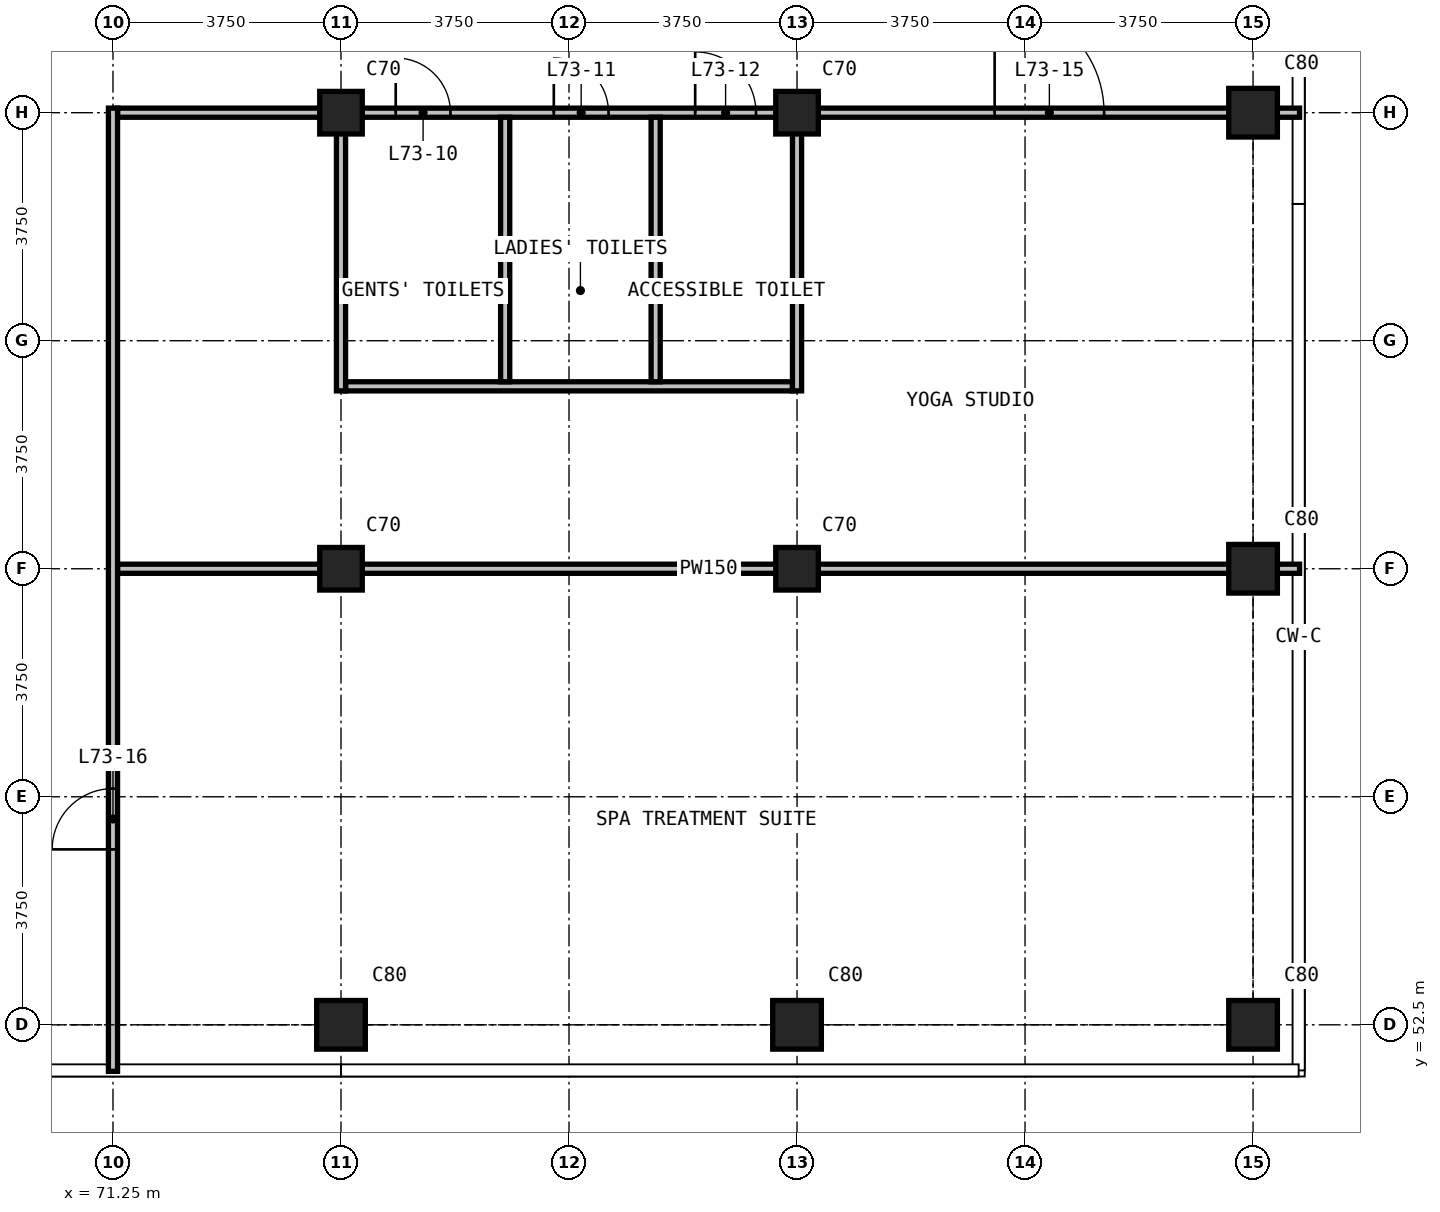
"""IFC4 building model, lengths in metres.
Left out: names, types, materials, properties, quantities, classifications, styles, units other than length and angle.
Written with IfcOpenShell. Run it as: python <this file> out.ifc"""

import sys

from ifc_helpers import new_model, si_unit, direction, frame, frame_2d, origin, origin_2d, place, context, subcontext, project, spatial, rectangle, extrude, element, fill, save


model = new_model("IFC4")
c1 = context("Model", 3, precision=1e-05, world=origin(), true_north=direction((0.0, 1.0)))
c2 = subcontext(c1, "Body", "Model", "MODEL_VIEW")
j1 = project(units=[si_unit("LENGTHUNIT", "METRE"), si_unit("PLANEANGLEUNIT", "RADIAN")], contexts=[c1])
p1 = place(None, origin())
s1 = spatial("IfcSite", under=j1, at=p1, CompositionType="ELEMENT")
p2 = place(p1, origin())
s2 = spatial("IfcBuilding", under=s1, at=p2, CompositionType="ELEMENT")
p3 = place(p2, frame((0.0, 0.0, 280.1)))
s3 = spatial("IfcBuildingStorey", under=s2, at=p3, CompositionType="ELEMENT", Elevation=280.1)
p4 = place(p3, frame((75.0, 52.5, 0.0), z_axis=(0.0, 0.0, 1.0), x_axis=(1.0, 0.0, 0.0)))
e1 = element("IfcColumn", 1, at=p4, inside=s3, PredefinedType="COLUMN", context=c2, shape_type="SweptSolid", body=[
    extrude(rectangle(XDim=0.8, YDim=0.8, at=origin_2d()), origin(), (0.0, 0.0, 1.0), 3.6),
])
for number, where, z_axis, x_axis in (
    (2, (75.0, 60.0, 0.0), (0.0, 0.0, 1.0), (1.0, 0.0, 0.0)),
    (3, (75.0, 67.5, 0.0), (0.0, 0.0, 1.0), (1.0, 0.0, 0.0)),
):
    element("IfcColumn", number, at=place(p3, frame(where, z_axis=z_axis, x_axis=x_axis)), inside=s3, PredefinedType="COLUMN", context=c2, shape_type="SweptSolid", body=[
        extrude(rectangle(XDim=0.7, YDim=0.7, at=origin_2d()), origin(), (0.0, 0.0, 1.0), 3.6),
    ])
p5 = place(p3, frame((82.5, 52.5, 0.0), z_axis=(0.0, 0.0, 1.0), x_axis=(1.0, 0.0, 0.0)))
e4 = element("IfcColumn", 4, at=p5, inside=s3, PredefinedType="COLUMN", context=c2, shape_type="SweptSolid", body=[
    extrude(rectangle(XDim=0.8, YDim=0.8, at=origin_2d()), origin(), (0.0, 0.0, 1.0), 3.6),
])
for number, where, z_axis, x_axis in (
    (5, (82.5, 60.0, 0.0), (0.0, 0.0, 1.0), (1.0, 0.0, 0.0)),
    (6, (82.5, 67.5, 0.0), (0.0, 0.0, 1.0), (1.0, 0.0, 0.0)),
):
    element("IfcColumn", number, at=place(p3, frame(where, z_axis=z_axis, x_axis=x_axis)), inside=s3, PredefinedType="COLUMN", context=c2, shape_type="SweptSolid", body=[
        extrude(rectangle(XDim=0.7, YDim=0.7, at=origin_2d()), origin(), (0.0, 0.0, 1.0), 3.6),
    ])
for number, where, z_axis, x_axis in (
    (7, (90.0, 52.5, 0.0), (0.0, 0.0, 1.0), (1.0, 0.0, 0.0)),
    (8, (90.0, 60.0, 0.0), (0.0, 0.0, 1.0), (1.0, 0.0, 0.0)),
    (9, (90.0, 67.5, 0.0), (0.0, 0.0, 1.0), (1.0, 0.0, 0.0)),
):
    element("IfcColumn", number, at=place(p3, frame(where, z_axis=z_axis, x_axis=x_axis)), inside=s3, PredefinedType="COLUMN", context=c2, shape_type="SweptSolid", body=[
        extrude(rectangle(XDim=0.8, YDim=0.8, at=origin_2d()), origin(), (0.0, 0.0, 1.0), 3.6),
    ])
p6 = place(p3, frame((71.325, 60.0, 0.0), z_axis=(0.0, 0.0, 1.0), x_axis=(1.0, 0.0, 0.0)))
e10 = element("IfcWall", 10, at=p6, inside=s3, PredefinedType="PARTITIONING", context=c2, shape_type="SweptSolid", body=[
    extrude(rectangle(XDim=19.44, YDim=0.15, at=frame_2d((9.72, 0.0))), origin(), (0.0, 0.0, 1.0), 3.3),
])
p7 = place(p3, frame((75.075, 63.0, 0.0), z_axis=(0.0, 0.0, 1.0), x_axis=(1.0, 0.0, 0.0)))
e11 = element("IfcWall", 11, at=p7, inside=s3, PredefinedType="PARTITIONING", context=c2, shape_type="SweptSolid", body=[
    extrude(rectangle(XDim=7.35, YDim=0.15, at=frame_2d((3.675, 0.0))), origin(), (0.0, 0.0, 1.0), 3.3),
])
p8 = place(p3, frame((71.325, 67.5, 0.0), z_axis=(0.0, 0.0, 1.0), x_axis=(1.0, 0.0, 0.0)))
e12 = element("IfcWall", 12, at=p8, inside=s3, PredefinedType="PARTITIONING", context=c2, shape_type="SweptSolid", body=[
    extrude(rectangle(XDim=19.44, YDim=0.15, at=frame_2d((9.72, 0.0))), origin(), (0.0, 0.0, 1.0), 3.3),
])
p9 = place(p8, frame((4.575, 0.0, 0.0)))
e13 = element("IfcOpeningElement", 13, at=p9, cuts=e12, PredefinedType="OPENING", context=c2, shape_type="SweptSolid", body=[
    extrude(rectangle(XDim=0.9, YDim=2.2, at=frame_2d((0.45, 1.1))), frame((0.0, 0.085, 0.0), z_axis=(0.0, -1.0, 0.0), x_axis=(1.0, 0.0, 0.0)), (0.0, 0.0, 1.0), 0.17),
])
p10 = place(p8, frame((7.175, 0.0, 0.0)))
e14 = element("IfcOpeningElement", 14, at=p10, cuts=e12, PredefinedType="OPENING", context=c2, shape_type="SweptSolid", body=[
    extrude(rectangle(XDim=0.9, YDim=2.2, at=frame_2d((0.45, 1.1))), frame((0.0, 0.085, 0.0), z_axis=(0.0, -1.0, 0.0), x_axis=(1.0, 0.0, 0.0)), (0.0, 0.0, 1.0), 0.17),
])
p11 = place(p8, frame((9.5, 0.0, 0.0)))
e15 = element("IfcOpeningElement", 15, at=p11, cuts=e12, PredefinedType="OPENING", context=c2, shape_type="SweptSolid", body=[
    extrude(rectangle(XDim=1.0, YDim=2.2, at=frame_2d((0.5, 1.1))), frame((0.0, 0.085, 0.0), z_axis=(0.0, -1.0, 0.0), x_axis=(1.0, 0.0, 0.0)), (0.0, 0.0, 1.0), 0.17),
])
p12 = place(p8, frame((14.425, 0.0, 0.0)))
e16 = element("IfcOpeningElement", 16, at=p12, cuts=e12, PredefinedType="OPENING", context=c2, shape_type="SweptSolid", body=[
    extrude(rectangle(XDim=1.8, YDim=2.2, at=frame_2d((0.9, 1.1))), frame((0.0, 0.085, 0.0), z_axis=(0.0, -1.0, 0.0), x_axis=(1.0, 0.0, 0.0)), (0.0, 0.0, 1.0), 0.17),
])
p13 = place(p3, frame((71.25, 51.735, 0.0), z_axis=(0.0, 0.0, 1.0), x_axis=(0.0, 1.0, 0.0)))
e17 = element("IfcWall", 17, at=p13, inside=s3, PredefinedType="PARTITIONING", context=c2, shape_type="SweptSolid", body=[
    extrude(rectangle(XDim=15.84, YDim=0.15, at=frame_2d((7.92, 0.0))), origin(), (0.0, 0.0, 1.0), 3.3),
])
p14 = place(p13, frame((3.65, 0.0, 0.0)))
e18 = element("IfcOpeningElement", 18, at=p14, cuts=e17, PredefinedType="OPENING", context=c2, shape_type="SweptSolid", body=[
    extrude(rectangle(XDim=1.0, YDim=2.2, at=frame_2d((0.5, 1.1))), frame((0.0, 0.085, 0.0), z_axis=(0.0, -1.0, 0.0), x_axis=(1.0, 0.0, 0.0)), (0.0, 0.0, 1.0), 0.17),
])
p15 = place(p3, frame((75.0, 62.925, 0.0), z_axis=(0.0, 0.0, 1.0), x_axis=(0.0, 1.0, 0.0)))
e19 = element("IfcWall", 19, at=p15, inside=s3, PredefinedType="PARTITIONING", context=c2, shape_type="SweptSolid", body=[
    extrude(rectangle(XDim=4.5, YDim=0.15, at=frame_2d((2.25, 0.0))), origin(), (0.0, 0.0, 1.0), 3.3),
])
for number, where, z_axis, x_axis in (
    (20, (77.7, 63.075, 0.0), (0.0, 0.0, 1.0), (0.0, 1.0, 0.0)),
    (21, (80.175, 63.075, 0.0), (0.0, 0.0, 1.0), (0.0, 1.0, 0.0)),
):
    element("IfcWall", number, at=place(p3, frame(where, z_axis=z_axis, x_axis=x_axis)), inside=s3, PredefinedType="PARTITIONING", context=c2, shape_type="SweptSolid", body=[
        extrude(rectangle(XDim=4.35, YDim=0.15, at=frame_2d((2.175, 0.0))), origin(), (0.0, 0.0, 1.0), 3.3),
    ])
p16 = place(p3, frame((82.5, 62.925, 0.0), z_axis=(0.0, 0.0, 1.0), x_axis=(0.0, 1.0, 0.0)))
e22 = element("IfcWall", 22, at=p16, inside=s3, PredefinedType="PARTITIONING", context=c2, shape_type="SweptSolid", body=[
    extrude(rectangle(XDim=4.5, YDim=0.15, at=frame_2d((2.25, 0.0))), origin(), (0.0, 0.0, 1.0), 3.3),
])
p17 = place(p9, origin())
e23 = element("IfcDoor", 23, at=p17, inside=s3, OperationType="SINGLE_SWING_LEFT", PredefinedType="DOOR", context=c2, shape_type="SweptSolid", body=[
    extrude(rectangle(XDim=0.9, YDim=2.2, at=frame_2d((0.45, 1.1))), frame((0.0, 0.025, 0.0), z_axis=(0.0, -1.0, 0.0), x_axis=(1.0, 0.0, 0.0)), (0.0, 0.0, 1.0), 0.05),
])
fill(e13, e23)
p18 = place(p10, origin())
e24 = element("IfcDoor", 24, at=p18, inside=s3, OperationType="SINGLE_SWING_LEFT", PredefinedType="DOOR", context=c2, shape_type="SweptSolid", body=[
    extrude(rectangle(XDim=0.9, YDim=2.2, at=frame_2d((0.45, 1.1))), frame((0.0, 0.025, 0.0), z_axis=(0.0, -1.0, 0.0), x_axis=(1.0, 0.0, 0.0)), (0.0, 0.0, 1.0), 0.05),
])
fill(e14, e24)
p19 = place(p11, origin())
e25 = element("IfcDoor", 25, at=p19, inside=s3, OperationType="SINGLE_SWING_LEFT", PredefinedType="DOOR", context=c2, shape_type="SweptSolid", body=[
    extrude(rectangle(XDim=1.0, YDim=2.2, at=frame_2d((0.5, 1.1))), frame((0.0, 0.025, 0.0), z_axis=(0.0, -1.0, 0.0), x_axis=(1.0, 0.0, 0.0)), (0.0, 0.0, 1.0), 0.05),
])
fill(e15, e25)
p20 = place(p12, origin())
e26 = element("IfcDoor", 26, at=p20, inside=s3, OperationType="DOUBLE_DOOR_SINGLE_SWING", PredefinedType="DOOR", context=c2, shape_type="SweptSolid", body=[
    extrude(rectangle(XDim=1.8, YDim=2.2, at=frame_2d((0.9, 1.1))), frame((0.0, 0.025, 0.0), z_axis=(0.0, -1.0, 0.0), x_axis=(1.0, 0.0, 0.0)), (0.0, 0.0, 1.0), 0.05),
])
fill(e16, e26)
p21 = place(p14, origin())
e27 = element("IfcDoor", 27, at=p21, inside=s3, OperationType="SINGLE_SWING_LEFT", PredefinedType="DOOR", context=c2, shape_type="SweptSolid", body=[
    extrude(rectangle(XDim=1.0, YDim=2.2, at=frame_2d((0.5, 1.1))), frame((0.0, 0.025, 0.0), z_axis=(0.0, -1.0, 0.0), x_axis=(1.0, 0.0, 0.0)), (0.0, 0.0, 1.0), 0.05),
])
fill(e18, e27)
save(model, sys.argv[1])
